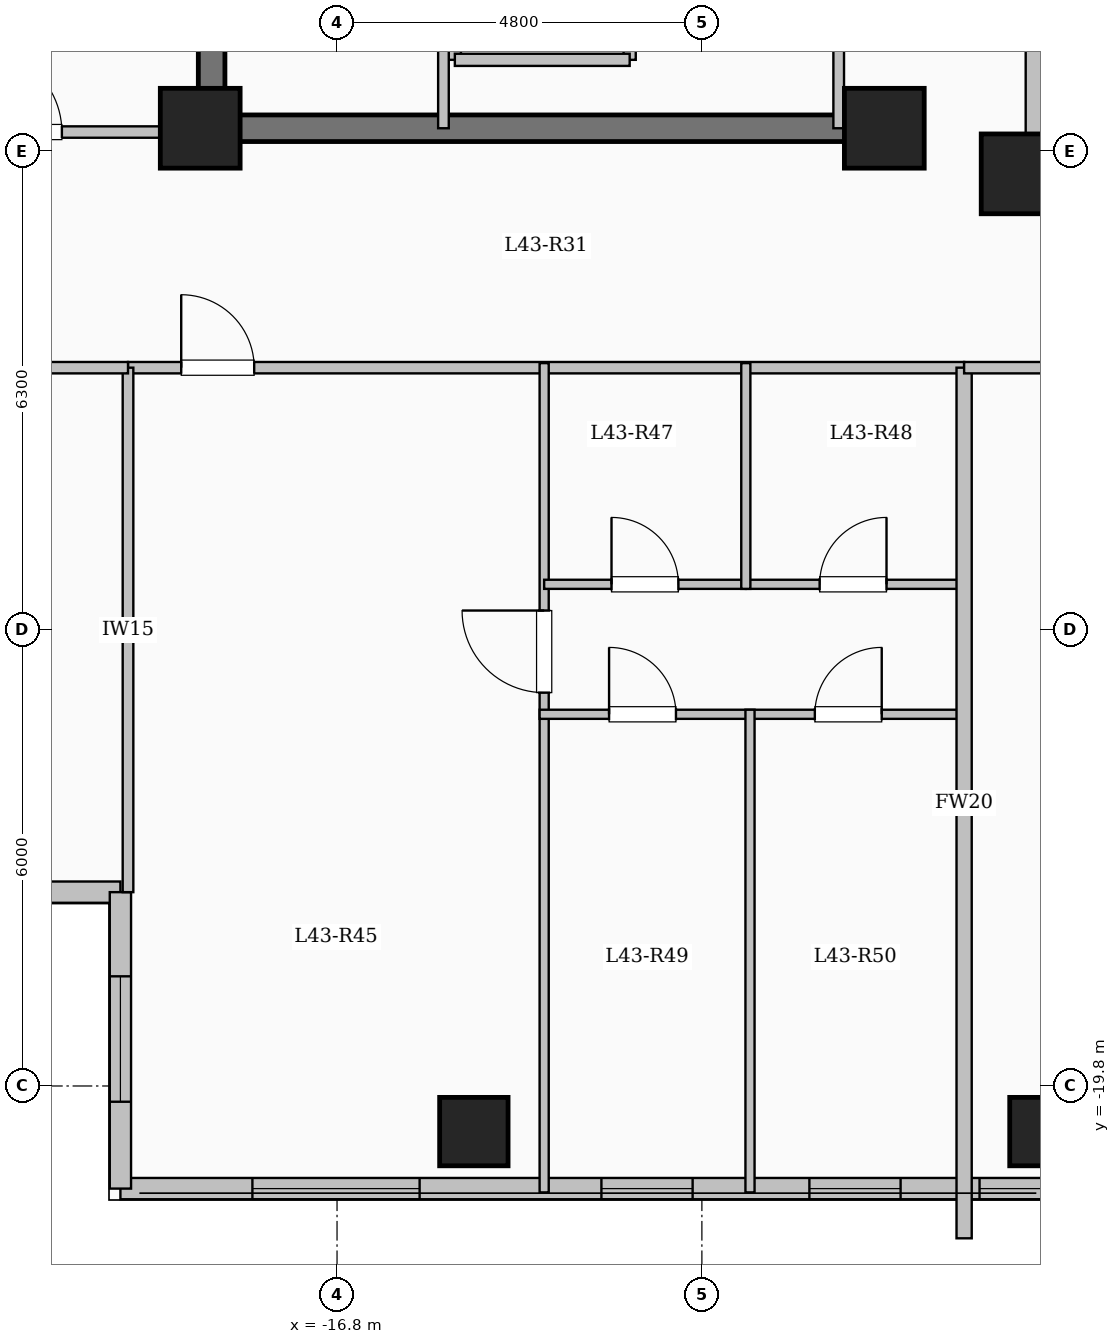
"""IFC4 building model, lengths in metres.
Left out: names, types, materials, properties, quantities, classifications, styles, units other than length and angle.
Written with IfcOpenShell. Run it as: python <this file> out.ifc"""

import sys

from ifc_helpers import new_model, si_unit, direction, frame, frame_2d, origin, origin_2d, place, context, subcontext, project, spatial, rectangle, extrude, element, fill, save


model = new_model("IFC4")
c1 = context("Model", 3, precision=1e-05, world=origin(), true_north=direction((0.0, 1.0)))
c2 = subcontext(c1, "Body", "Model", "MODEL_VIEW")
j1 = project(units=[si_unit("LENGTHUNIT", "METRE"), si_unit("PLANEANGLEUNIT", "RADIAN")], contexts=[c1])
p1 = place(None, origin())
s1 = spatial("IfcSite", under=j1, at=p1, CompositionType="ELEMENT")
p2 = place(p1, origin())
s2 = spatial("IfcBuilding", under=s1, at=p2, CompositionType="ELEMENT")
p3 = place(p2, frame((0.0, 0.0, 159.4)))
s3 = spatial("IfcBuildingStorey", under=s2, at=p3, CompositionType="ELEMENT", Elevation=159.4)
for number, where, z_axis, x_axis in (
    (1, (-7.8, -7.8, 0.0), (0.0, 0.0, 1.0), (1.0, 0.0, 0.0)),
    (2, (-9.6, -7.2, 0.0), (0.0, 0.0, 1.0), (1.0, 0.0, 0.0)),
    (3, (-18.6, -7.2, 0.0), (0.0, 0.0, 1.0), (1.0, 0.0, 0.0)),
):
    element("IfcColumn", number, at=place(p3, frame(where, z_axis=z_axis, x_axis=x_axis)), inside=s3, PredefinedType="COLUMN", context=c2, shape_type="SweptSolid", body=[
        extrude(rectangle(XDim=1.05, YDim=1.05, at=origin_2d()), origin(), (0.0, 0.0, 1.0), 3.35),
    ])
for number, where, z_axis, x_axis in (
    (4, (-15.0, -20.4, 0.0), (0.0, 0.0, 1.0), (1.0, 0.0, 0.0)),
    (5, (-7.5, -20.4, 0.0), (0.0, 0.0, 1.0), (1.0, 0.0, 0.0)),
):
    element("IfcColumn", number, at=place(p3, frame(where, z_axis=z_axis, x_axis=x_axis)), inside=s3, PredefinedType="COLUMN", context=c2, shape_type="SweptSolid", body=[
        extrude(rectangle(XDim=0.9, YDim=0.9, at=origin_2d()), origin(), (0.0, 0.0, 1.0), 3.35),
    ])
p4 = place(p3, frame((-7.62, -7.62, 0.0), z_axis=(0.0, 0.0, 1.0), x_axis=(1.0, 0.0, 0.0)))
e6 = element("IfcWall", 6, at=p4, inside=s3, PredefinedType="SOLIDWALL", context=c2, shape_type="SweptSolid", body=[
    extrude(rectangle(XDim=15.24, YDim=0.24, at=frame_2d((7.62, 0.0))), origin(), (0.0, 0.0, 1.0), 3.1),
])
p5 = place(p4, frame((6.92, 0.0, 0.95)))
e7 = element("IfcOpeningElement", 7, at=p5, cuts=e6, PredefinedType="OPENING", context=c2, shape_type="SweptSolid", body=[
    extrude(rectangle(XDim=1.4, YDim=1.5, at=frame_2d((0.7, 0.75))), frame((0.0, 0.13, 0.0), z_axis=(0.0, -1.0, 0.0), x_axis=(1.0, 0.0, 0.0)), (0.0, 0.0, 1.0), 0.26),
])
p6 = place(p3, frame((-7.62, 7.62, 0.0), z_axis=(0.0, 0.0, 1.0), x_axis=(0.0, -1.0, 0.0)))
e8 = element("IfcWall", 8, at=p6, inside=s3, PredefinedType="SOLIDWALL", context=c2, shape_type="SweptSolid", body=[
    extrude(rectangle(XDim=15.24, YDim=0.24, at=frame_2d((7.62, 0.0))), origin(), (0.0, 0.0, 1.0), 3.1),
])
p7 = place(p6, frame((6.92, 0.0, 0.95)))
e9 = element("IfcOpeningElement", 9, at=p7, cuts=e8, PredefinedType="OPENING", context=c2, shape_type="SweptSolid", body=[
    extrude(rectangle(XDim=1.4, YDim=1.5, at=frame_2d((0.7, 0.75))), frame((0.0, 0.13, 0.0), z_axis=(0.0, -1.0, 0.0), x_axis=(1.0, 0.0, 0.0)), (0.0, 0.0, 1.0), 0.26),
])
p8 = place(p3, frame((-19.65, -17.25, 0.0), z_axis=(0.0, 0.0, 1.0), x_axis=(-1.0, 0.0, 0.0)))
e10 = element("IfcWall", 10, at=p8, inside=s3, PredefinedType="SOLIDWALL", context=c2, shape_type="SweptSolid", body=[
    extrude(rectangle(XDim=5.4, YDim=0.28, at=frame_2d((2.7, 0.0))), origin(), (0.0, 0.0, 1.0), 3.1),
])
p9 = place(p8, frame((1.575, 0.0, 0.9)))
e11 = element("IfcOpeningElement", 11, at=p9, cuts=e10, PredefinedType="OPENING", context=c2, shape_type="SweptSolid", body=[
    extrude(rectangle(XDim=2.2, YDim=1.75, at=frame_2d((1.1, 0.875))), frame((0.0, 0.15, 0.0), z_axis=(0.0, -1.0, 0.0), x_axis=(1.0, 0.0, 0.0)), (0.0, 0.0, 1.0), 0.3),
])
p10 = place(p3, frame((-7.35, -21.15, 0.0), z_axis=(0.0, 0.0, 1.0), x_axis=(-1.0, 0.0, 0.0)))
e12 = element("IfcWall", 12, at=p10, inside=s3, PredefinedType="SOLIDWALL", context=c2, shape_type="SweptSolid", body=[
    extrude(rectangle(XDim=12.3, YDim=0.28, at=frame_2d((6.15, 0.0))), origin(), (0.0, 0.0, 1.0), 3.1),
])
p11 = place(p10, frame((0.147, 0.0, 0.95)))
e13 = element("IfcOpeningElement", 13, at=p11, cuts=e12, PredefinedType="OPENING", context=c2, shape_type="SweptSolid", body=[
    extrude(rectangle(XDim=0.85, YDim=1.5, at=frame_2d((0.425, 0.75))), frame((0.0, 0.15, 0.0), z_axis=(0.0, -1.0, 0.0), x_axis=(1.0, 0.0, 0.0)), (0.0, 0.0, 1.0), 0.3),
])
p12 = place(p10, frame((2.036, 0.0, 0.95)))
e14 = element("IfcOpeningElement", 14, at=p12, cuts=e12, PredefinedType="OPENING", context=c2, shape_type="SweptSolid", body=[
    extrude(rectangle(XDim=1.2, YDim=1.5, at=frame_2d((0.6, 0.75))), frame((0.0, 0.15, 0.0), z_axis=(0.0, -1.0, 0.0), x_axis=(1.0, 0.0, 0.0)), (0.0, 0.0, 1.0), 0.3),
])
p13 = place(p10, frame((4.772, 0.0, 0.95)))
e15 = element("IfcOpeningElement", 15, at=p13, cuts=e12, PredefinedType="OPENING", context=c2, shape_type="SweptSolid", body=[
    extrude(rectangle(XDim=1.2, YDim=1.5, at=frame_2d((0.6, 0.75))), frame((0.0, 0.15, 0.0), z_axis=(0.0, -1.0, 0.0), x_axis=(1.0, 0.0, 0.0)), (0.0, 0.0, 1.0), 0.3),
])
p14 = place(p10, frame((8.364, 0.0, 0.9)))
e16 = element("IfcOpeningElement", 16, at=p14, cuts=e12, PredefinedType="OPENING", context=c2, shape_type="SweptSolid", body=[
    extrude(rectangle(XDim=2.2, YDim=1.75, at=frame_2d((1.1, 0.875))), frame((0.0, 0.15, 0.0), z_axis=(0.0, -1.0, 0.0), x_axis=(1.0, 0.0, 0.0)), (0.0, 0.0, 1.0), 0.3),
])
p15 = place(p3, frame((-19.65, -21.15, 0.0), z_axis=(0.0, 0.0, 1.0), x_axis=(0.0, 1.0, 0.0)))
e17 = element("IfcWall", 17, at=p15, inside=s3, PredefinedType="SOLIDWALL", context=c2, shape_type="SweptSolid", body=[
    extrude(rectangle(XDim=3.9, YDim=0.28, at=frame_2d((1.95, 0.0))), origin(), (0.0, 0.0, 1.0), 3.1),
])
p16 = place(p15, frame((1.143, 0.0, 0.9)))
e18 = element("IfcOpeningElement", 18, at=p16, cuts=e17, PredefinedType="OPENING", context=c2, shape_type="SweptSolid", body=[
    extrude(rectangle(XDim=1.65, YDim=1.6, at=frame_2d((0.825, 0.8))), frame((0.0, 0.15, 0.0), z_axis=(0.0, -1.0, 0.0), x_axis=(1.0, 0.0, 0.0)), (0.0, 0.0, 1.0), 0.3),
])
for number, where, z_axis, x_axis in (
    (19, (-15.25, -6.3, 0.0), (0.0, 0.0, 1.0), (0.0, 1.0, 0.0)),
    (20, (-12.95, -6.3, 0.0), (0.0, 0.0, 1.0), (0.0, 1.0, 0.0)),
):
    element("IfcWall", number, at=place(p3, frame(where, z_axis=z_axis, x_axis=x_axis)), inside=s3, PredefinedType="SOLIDWALL", context=c2, shape_type="SweptSolid", body=[
        extrude(rectangle(XDim=2.6, YDim=0.16, at=frame_2d((1.3, 0.0))), origin(), (0.0, 0.0, 1.0), 3.1),
    ])
p17 = place(p3, frame((-15.25, -6.3, 0.0), z_axis=(0.0, 0.0, 1.0), x_axis=(1.0, 0.0, 0.0)))
e21 = element("IfcWall", 21, at=p17, inside=s3, PredefinedType="SOLIDWALL", context=c2, shape_type="SweptSolid", body=[
    extrude(rectangle(XDim=2.3, YDim=0.16, at=frame_2d((1.15, 0.0))), origin(), (0.0, 0.0, 1.0), 3.1),
])
p18 = place(p3, frame((-18.45, -7.375, 0.0), z_axis=(0.0, 0.0, 1.0), x_axis=(0.0, 1.0, 0.0)))
e22 = element("IfcWall", 22, at=p18, inside=s3, PredefinedType="SHEAR", context=c2, shape_type="SweptSolid", body=[
    extrude(rectangle(XDim=14.05, YDim=0.35, at=frame_2d((7.025, 0.0))), origin(), (0.0, 0.0, 1.0), 3.35),
])
p19 = place(p3, frame((-18.625, -7.2, 0.0), z_axis=(0.0, 0.0, 1.0), x_axis=(1.0, 0.0, 0.0)))
e23 = element("IfcWall", 23, at=p19, inside=s3, PredefinedType="SHEAR", context=c2, shape_type="SweptSolid", body=[
    extrude(rectangle(XDim=8.55, YDim=0.35, at=frame_2d((4.275, 0.0))), origin(), (0.0, 0.0, 1.0), 3.35),
])
p20 = place(p3, frame((-15.4, -7.2, 0.0), z_axis=(0.0, 0.0, 1.0), x_axis=(0.0, 1.0, 0.0)))
e24 = element("IfcWall", 24, at=p20, inside=s3, PredefinedType="PARTITIONING", context=c2, shape_type="SweptSolid", body=[
    extrude(rectangle(XDim=10.45, YDim=0.14, at=frame_2d((5.225, 0.0))), origin(), (0.0, 0.0, 1.0), 3.1),
])
p21 = place(p20, frame((9.25, 0.0, 0.0)))
e25 = element("IfcOpeningElement", 25, at=p21, cuts=e24, PredefinedType="OPENING", context=c2, shape_type="SweptSolid", body=[
    extrude(rectangle(XDim=0.9, YDim=2.08, at=frame_2d((0.45, 1.04))), frame((0.0, 0.08, 0.0), z_axis=(0.0, -1.0, 0.0), x_axis=(1.0, 0.0, 0.0)), (0.0, 0.0, 1.0), 0.16),
])
p22 = place(p3, frame((-10.2, -7.2, 0.0), z_axis=(0.0, 0.0, 1.0), x_axis=(0.0, 1.0, 0.0)))
e26 = element("IfcWall", 26, at=p22, inside=s3, PredefinedType="PARTITIONING", context=c2, shape_type="SweptSolid", body=[
    extrude(rectangle(XDim=9.12, YDim=0.14, at=frame_2d((4.56, 0.0))), origin(), (0.0, 0.0, 1.0), 3.1),
])
p23 = place(p22, frame((1.9, 0.0, 0.0)))
e27 = element("IfcOpeningElement", 27, at=p23, cuts=e26, PredefinedType="OPENING", context=c2, shape_type="SweptSolid", body=[
    extrude(rectangle(XDim=0.95, YDim=2.12, at=frame_2d((0.475, 1.06))), frame((0.0, 0.08, 0.0), z_axis=(0.0, -1.0, 0.0), x_axis=(1.0, 0.0, 0.0)), (0.0, 0.0, 1.0), 0.16),
])
p24 = place(p22, frame((6.6, 0.0, 0.0)))
e28 = element("IfcOpeningElement", 28, at=p24, cuts=e26, PredefinedType="OPENING", context=c2, shape_type="SweptSolid", body=[
    extrude(rectangle(XDim=0.95, YDim=2.12, at=frame_2d((0.475, 1.06))), frame((0.0, 0.08, 0.0), z_axis=(0.0, -1.0, 0.0), x_axis=(1.0, 0.0, 0.0)), (0.0, 0.0, 1.0), 0.16),
])
p25 = place(p3, frame((-19.55, -10.35, 0.0), z_axis=(0.0, 0.0, 1.0), x_axis=(1.0, 0.0, 0.0)))
e29 = element("IfcWall", 29, at=p25, inside=s3, PredefinedType="PARTITIONING", context=c2, shape_type="SweptSolid", body=[
    extrude(rectangle(XDim=11.0, YDim=0.15, at=frame_2d((5.5, 0.0))), origin(), (0.0, 0.0, 1.0), 3.1),
])
p26 = place(p25, frame((0.7, 0.0, 0.0)))
e30 = element("IfcOpeningElement", 30, at=p26, cuts=e29, PredefinedType="OPENING", context=c2, shape_type="SweptSolid", body=[
    extrude(rectangle(XDim=0.96, YDim=2.15, at=frame_2d((0.48, 1.075))), frame((0.0, 0.085, 0.0), z_axis=(0.0, -1.0, 0.0), x_axis=(1.0, 0.0, 0.0)), (0.0, 0.0, 1.0), 0.17),
])
p27 = place(p3, frame((-14.075, -21.2, 0.0), z_axis=(0.0, 0.0, 1.0), x_axis=(0.0, 1.0, 0.0)))
e31 = element("IfcWall", 31, at=p27, inside=s3, PredefinedType="PARTITIONING", context=c2, shape_type="SweptSolid", body=[
    extrude(rectangle(XDim=10.91, YDim=0.12, at=frame_2d((5.455, 0.0))), origin(), (0.0, 0.0, 1.0), 3.1),
])
p28 = place(p27, frame((6.575, 0.0, 0.0)))
e32 = element("IfcOpeningElement", 32, at=p28, cuts=e31, PredefinedType="OPENING", context=c2, shape_type="SweptSolid", body=[
    extrude(rectangle(XDim=1.08, YDim=2.15, at=frame_2d((0.54, 1.075))), frame((0.0, 0.07, 0.0), z_axis=(0.0, -1.0, 0.0), x_axis=(1.0, 0.0, 0.0)), (0.0, 0.0, 1.0), 0.14),
])
p29 = place(p3, frame((-14.075, -13.2, 0.0), z_axis=(0.0, 0.0, 1.0), x_axis=(1.0, 0.0, 0.0)))
e33 = element("IfcWall", 33, at=p29, inside=s3, PredefinedType="PARTITIONING", context=c2, shape_type="SweptSolid", body=[
    extrude(rectangle(XDim=2.653, YDim=0.12, at=frame_2d((1.326, 0.0))), origin(), (0.0, 0.0, 1.0), 3.1),
])
p30 = place(p29, frame((0.886, 0.0, 0.0)))
e34 = element("IfcOpeningElement", 34, at=p30, cuts=e33, PredefinedType="OPENING", context=c2, shape_type="SweptSolid", body=[
    extrude(rectangle(XDim=0.88, YDim=2.1, at=frame_2d((0.44, 1.05))), frame((0.0, 0.07, 0.0), z_axis=(0.0, -1.0, 0.0), x_axis=(1.0, 0.0, 0.0)), (0.0, 0.0, 1.0), 0.14),
])
p31 = place(p3, frame((-11.422, -13.2, 0.0), z_axis=(0.0, 0.0, 1.0), x_axis=(1.0, 0.0, 0.0)))
e35 = element("IfcWall", 35, at=p31, inside=s3, PredefinedType="PARTITIONING", context=c2, shape_type="SweptSolid", body=[
    extrude(rectangle(XDim=2.822, YDim=0.12, at=frame_2d((1.411, 0.0))), origin(), (0.0, 0.0, 1.0), 3.1),
])
p32 = place(p31, frame((0.971, 0.0, 0.0)))
e36 = element("IfcOpeningElement", 36, at=p32, cuts=e35, PredefinedType="OPENING", context=c2, shape_type="SweptSolid", body=[
    extrude(rectangle(XDim=0.88, YDim=2.1, at=frame_2d((0.44, 1.05))), frame((0.0, 0.07, 0.0), z_axis=(0.0, -1.0, 0.0), x_axis=(1.0, 0.0, 0.0)), (0.0, 0.0, 1.0), 0.14),
])
p33 = place(p3, frame((-14.135, -14.91, 0.0), z_axis=(0.0, 0.0, 1.0), x_axis=(1.0, 0.0, 0.0)))
e37 = element("IfcWall", 37, at=p33, inside=s3, PredefinedType="PARTITIONING", context=c2, shape_type="SweptSolid", body=[
    extrude(rectangle(XDim=5.595, YDim=0.12, at=frame_2d((2.797, 0.0))), origin(), (0.0, 0.0, 1.0), 3.1),
])
p34 = place(p33, frame((0.914, 0.0, 0.0)))
e38 = element("IfcOpeningElement", 38, at=p34, cuts=e37, PredefinedType="OPENING", context=c2, shape_type="SweptSolid", body=[
    extrude(rectangle(XDim=0.88, YDim=2.1, at=frame_2d((0.44, 1.05))), frame((0.0, 0.07, 0.0), z_axis=(0.0, -1.0, 0.0), x_axis=(1.0, 0.0, 0.0)), (0.0, 0.0, 1.0), 0.14),
])
p35 = place(p33, frame((3.621, 0.0, 0.0)))
e39 = element("IfcOpeningElement", 39, at=p35, cuts=e37, PredefinedType="OPENING", context=c2, shape_type="SweptSolid", body=[
    extrude(rectangle(XDim=0.88, YDim=2.1, at=frame_2d((0.44, 1.05))), frame((0.0, 0.07, 0.0), z_axis=(0.0, -1.0, 0.0), x_axis=(1.0, 0.0, 0.0)), (0.0, 0.0, 1.0), 0.14),
])
p36 = place(p3, frame((-11.422, -13.26, 0.0), z_axis=(0.0, 0.0, 1.0), x_axis=(0.0, 1.0, 0.0)))
e40 = element("IfcWall", 40, at=p36, inside=s3, PredefinedType="PARTITIONING", context=c2, shape_type="SweptSolid", body=[
    extrude(rectangle(XDim=2.97, YDim=0.12, at=frame_2d((1.485, 0.0))), origin(), (0.0, 0.0, 1.0), 3.1),
])
p37 = place(p3, frame((-11.367, -21.2, 0.0), z_axis=(0.0, 0.0, 1.0), x_axis=(0.0, 1.0, 0.0)))
e41 = element("IfcWall", 41, at=p37, inside=s3, PredefinedType="PARTITIONING", context=c2, shape_type="SweptSolid", body=[
    extrude(rectangle(XDim=6.35, YDim=0.12, at=frame_2d((3.175, 0.0))), origin(), (0.0, 0.0, 1.0), 3.1),
])
p38 = place(p3, frame((-8.55, -21.804, 0.0), z_axis=(0.0, 0.0, 1.0), x_axis=(0.0, 1.0, 0.0)))
e42 = element("IfcWall", 42, at=p38, inside=s3, PredefinedType="SOLIDWALL", context=c2, shape_type="SweptSolid", body=[
    extrude(rectangle(XDim=11.454, YDim=0.2, at=frame_2d((5.727, 0.0))), origin(), (0.0, 0.0, 1.0), 3.1),
])
p39 = place(p3, frame((-8.55, -10.35, 0.0), z_axis=(0.0, 0.0, 1.0), x_axis=(1.0, 0.0, 0.0)))
e43 = element("IfcWall", 43, at=p39, inside=s3, PredefinedType="PARTITIONING", context=c2, shape_type="SweptSolid", body=[
    extrude(rectangle(XDim=17.1, YDim=0.15, at=frame_2d((8.55, 0.0))), origin(), (0.0, 0.0, 1.0), 3.1),
])
p40 = place(p39, frame((1.6, 0.0, 0.0)))
e44 = element("IfcOpeningElement", 44, at=p40, cuts=e43, PredefinedType="OPENING", context=c2, shape_type="SweptSolid", body=[
    extrude(rectangle(XDim=0.96, YDim=2.15, at=frame_2d((0.48, 1.075))), frame((0.0, 0.085, 0.0), z_axis=(0.0, -1.0, 0.0), x_axis=(1.0, 0.0, 0.0)), (0.0, 0.0, 1.0), 0.17),
])
p41 = place(p3, frame((-25.08, -7.25, 0.0), z_axis=(0.0, 0.0, 1.0), x_axis=(1.0, 0.0, 0.0)))
e45 = element("IfcWall", 45, at=p41, inside=s3, PredefinedType="PARTITIONING", context=c2, shape_type="SweptSolid", body=[
    extrude(rectangle(XDim=6.63, YDim=0.15, at=frame_2d((3.315, 0.0))), origin(), (0.0, 0.0, 1.0), 3.1),
])
p42 = place(p41, frame((3.58, 0.0, 0.0)))
e46 = element("IfcOpeningElement", 46, at=p42, cuts=e45, PredefinedType="OPENING", context=c2, shape_type="SweptSolid", body=[
    extrude(rectangle(XDim=1.08, YDim=2.15, at=frame_2d((0.54, 1.075))), frame((0.0, 0.085, 0.0), z_axis=(0.0, -1.0, 0.0), x_axis=(1.0, 0.0, 0.0)), (0.0, 0.0, 1.0), 0.17),
])
p43 = place(p3, frame((-19.55, -17.25, 0.0), z_axis=(0.0, 0.0, 1.0), x_axis=(0.0, 1.0, 0.0)))
e47 = element("IfcWall", 47, at=p43, inside=s3, PredefinedType="PARTITIONING", context=c2, shape_type="SweptSolid", body=[
    extrude(rectangle(XDim=6.9, YDim=0.14, at=frame_2d((3.45, 0.0))), origin(), (0.0, 0.0, 1.0), 3.1),
])
p44 = place(p3, frame((-25.08, -10.35, 0.0), z_axis=(0.0, 0.0, 1.0), x_axis=(1.0, 0.0, 0.0)))
e48 = element("IfcWall", 48, at=p44, inside=s3, PredefinedType="PARTITIONING", context=c2, shape_type="SweptSolid", body=[
    extrude(rectangle(XDim=5.53, YDim=0.15, at=frame_2d((2.765, 0.0))), origin(), (0.0, 0.0, 1.0), 3.1),
])
p45 = place(p44, frame((2.29, 0.0, 0.0)))
e49 = element("IfcOpeningElement", 49, at=p45, cuts=e48, PredefinedType="OPENING", context=c2, shape_type="SweptSolid", body=[
    extrude(rectangle(XDim=0.95, YDim=2.15, at=frame_2d((0.475, 1.075))), frame((0.0, 0.085, 0.0), z_axis=(0.0, -1.0, 0.0), x_axis=(1.0, 0.0, 0.0)), (0.0, 0.0, 1.0), 0.17),
])
p46 = place(p11, origin())
e50 = element("IfcWindow", 50, at=p46, inside=s3, PartitioningType="SINGLE_PANEL", PredefinedType="WINDOW", context=c2, shape_type="SweptSolid", body=[
    extrude(rectangle(XDim=0.85, YDim=1.5, at=frame_2d((0.425, 0.75))), frame((0.0, 0.03, 0.0), z_axis=(0.0, -1.0, 0.0), x_axis=(1.0, 0.0, 0.0)), (0.0, 0.0, 1.0), 0.06),
])
fill(e13, e50)
p47 = place(p12, origin())
e51 = element("IfcWindow", 51, at=p47, inside=s3, PartitioningType="SINGLE_PANEL", PredefinedType="WINDOW", context=c2, shape_type="SweptSolid", body=[
    extrude(rectangle(XDim=1.2, YDim=1.5, at=frame_2d((0.6, 0.75))), frame((0.0, 0.03, 0.0), z_axis=(0.0, -1.0, 0.0), x_axis=(1.0, 0.0, 0.0)), (0.0, 0.0, 1.0), 0.06),
])
fill(e14, e51)
p48 = place(p13, origin())
e52 = element("IfcWindow", 52, at=p48, inside=s3, PartitioningType="SINGLE_PANEL", PredefinedType="WINDOW", context=c2, shape_type="SweptSolid", body=[
    extrude(rectangle(XDim=1.2, YDim=1.5, at=frame_2d((0.6, 0.75))), frame((0.0, 0.03, 0.0), z_axis=(0.0, -1.0, 0.0), x_axis=(1.0, 0.0, 0.0)), (0.0, 0.0, 1.0), 0.06),
])
fill(e15, e52)
p49 = place(p14, origin())
e53 = element("IfcWindow", 53, at=p49, inside=s3, PartitioningType="SINGLE_PANEL", PredefinedType="WINDOW", context=c2, shape_type="SweptSolid", body=[
    extrude(rectangle(XDim=2.2, YDim=1.75, at=frame_2d((1.1, 0.875))), frame((0.0, 0.03, 0.0), z_axis=(0.0, -1.0, 0.0), x_axis=(1.0, 0.0, 0.0)), (0.0, 0.0, 1.0), 0.06),
])
fill(e16, e53)
p50 = place(p16, origin())
e54 = element("IfcWindow", 54, at=p50, inside=s3, PartitioningType="SINGLE_PANEL", PredefinedType="WINDOW", context=c2, shape_type="SweptSolid", body=[
    extrude(rectangle(XDim=1.65, YDim=1.6, at=frame_2d((0.825, 0.8))), frame((0.0, 0.03, 0.0), z_axis=(0.0, -1.0, 0.0), x_axis=(1.0, 0.0, 0.0)), (0.0, 0.0, 1.0), 0.06),
])
fill(e18, e54)
p51 = place(p26, origin())
e55 = element("IfcDoor", 55, at=p51, inside=s3, OperationType="SINGLE_SWING_LEFT", PredefinedType="DOOR", context=c2, shape_type="SweptSolid", body=[
    extrude(rectangle(XDim=0.96, YDim=2.15, at=frame_2d((0.48, 1.075))), frame((0.0, 0.025, 0.0), z_axis=(0.0, -1.0, 0.0), x_axis=(1.0, 0.0, 0.0)), (0.0, 0.0, 1.0), 0.05),
])
fill(e30, e55)
p52 = place(p28, origin())
e56 = element("IfcDoor", 56, at=p52, inside=s3, OperationType="SINGLE_SWING_RIGHT", PredefinedType="DOOR", context=c2, shape_type="SweptSolid", body=[
    extrude(rectangle(XDim=1.08, YDim=2.15, at=frame_2d((0.54, 1.075))), frame((0.0, 0.025, 0.0), z_axis=(0.0, -1.0, 0.0), x_axis=(1.0, 0.0, 0.0)), (0.0, 0.0, 1.0), 0.05),
])
fill(e32, e56)
p53 = place(p30, origin())
e57 = element("IfcDoor", 57, at=p53, inside=s3, OperationType="SINGLE_SWING_LEFT", PredefinedType="DOOR", context=c2, shape_type="SweptSolid", body=[
    extrude(rectangle(XDim=0.88, YDim=2.1, at=frame_2d((0.44, 1.05))), frame((0.0, 0.025, 0.0), z_axis=(0.0, -1.0, 0.0), x_axis=(1.0, 0.0, 0.0)), (0.0, 0.0, 1.0), 0.05),
])
fill(e34, e57)
p54 = place(p32, origin())
e58 = element("IfcDoor", 58, at=p54, inside=s3, OperationType="SINGLE_SWING_RIGHT", PredefinedType="DOOR", context=c2, shape_type="SweptSolid", body=[
    extrude(rectangle(XDim=0.88, YDim=2.1, at=frame_2d((0.44, 1.05))), frame((0.0, 0.025, 0.0), z_axis=(0.0, -1.0, 0.0), x_axis=(1.0, 0.0, 0.0)), (0.0, 0.0, 1.0), 0.05),
])
fill(e36, e58)
p55 = place(p34, origin())
e59 = element("IfcDoor", 59, at=p55, inside=s3, OperationType="SINGLE_SWING_LEFT", PredefinedType="DOOR", context=c2, shape_type="SweptSolid", body=[
    extrude(rectangle(XDim=0.88, YDim=2.1, at=frame_2d((0.44, 1.05))), frame((0.0, 0.025, 0.0), z_axis=(0.0, -1.0, 0.0), x_axis=(1.0, 0.0, 0.0)), (0.0, 0.0, 1.0), 0.05),
])
fill(e38, e59)
p56 = place(p35, origin())
e60 = element("IfcDoor", 60, at=p56, inside=s3, OperationType="SINGLE_SWING_RIGHT", PredefinedType="DOOR", context=c2, shape_type="SweptSolid", body=[
    extrude(rectangle(XDim=0.88, YDim=2.1, at=frame_2d((0.44, 1.05))), frame((0.0, 0.025, 0.0), z_axis=(0.0, -1.0, 0.0), x_axis=(1.0, 0.0, 0.0)), (0.0, 0.0, 1.0), 0.05),
])
fill(e39, e60)
p57 = place(p42, origin())
e61 = element("IfcDoor", 61, at=p57, inside=s3, OperationType="SINGLE_SWING_LEFT", PredefinedType="DOOR", context=c2, shape_type="SweptSolid", body=[
    extrude(rectangle(XDim=1.08, YDim=2.15, at=frame_2d((0.54, 1.075))), frame((0.0, 0.025, 0.0), z_axis=(0.0, -1.0, 0.0), x_axis=(1.0, 0.0, 0.0)), (0.0, 0.0, 1.0), 0.05),
])
fill(e46, e61)
save(model, sys.argv[1])
